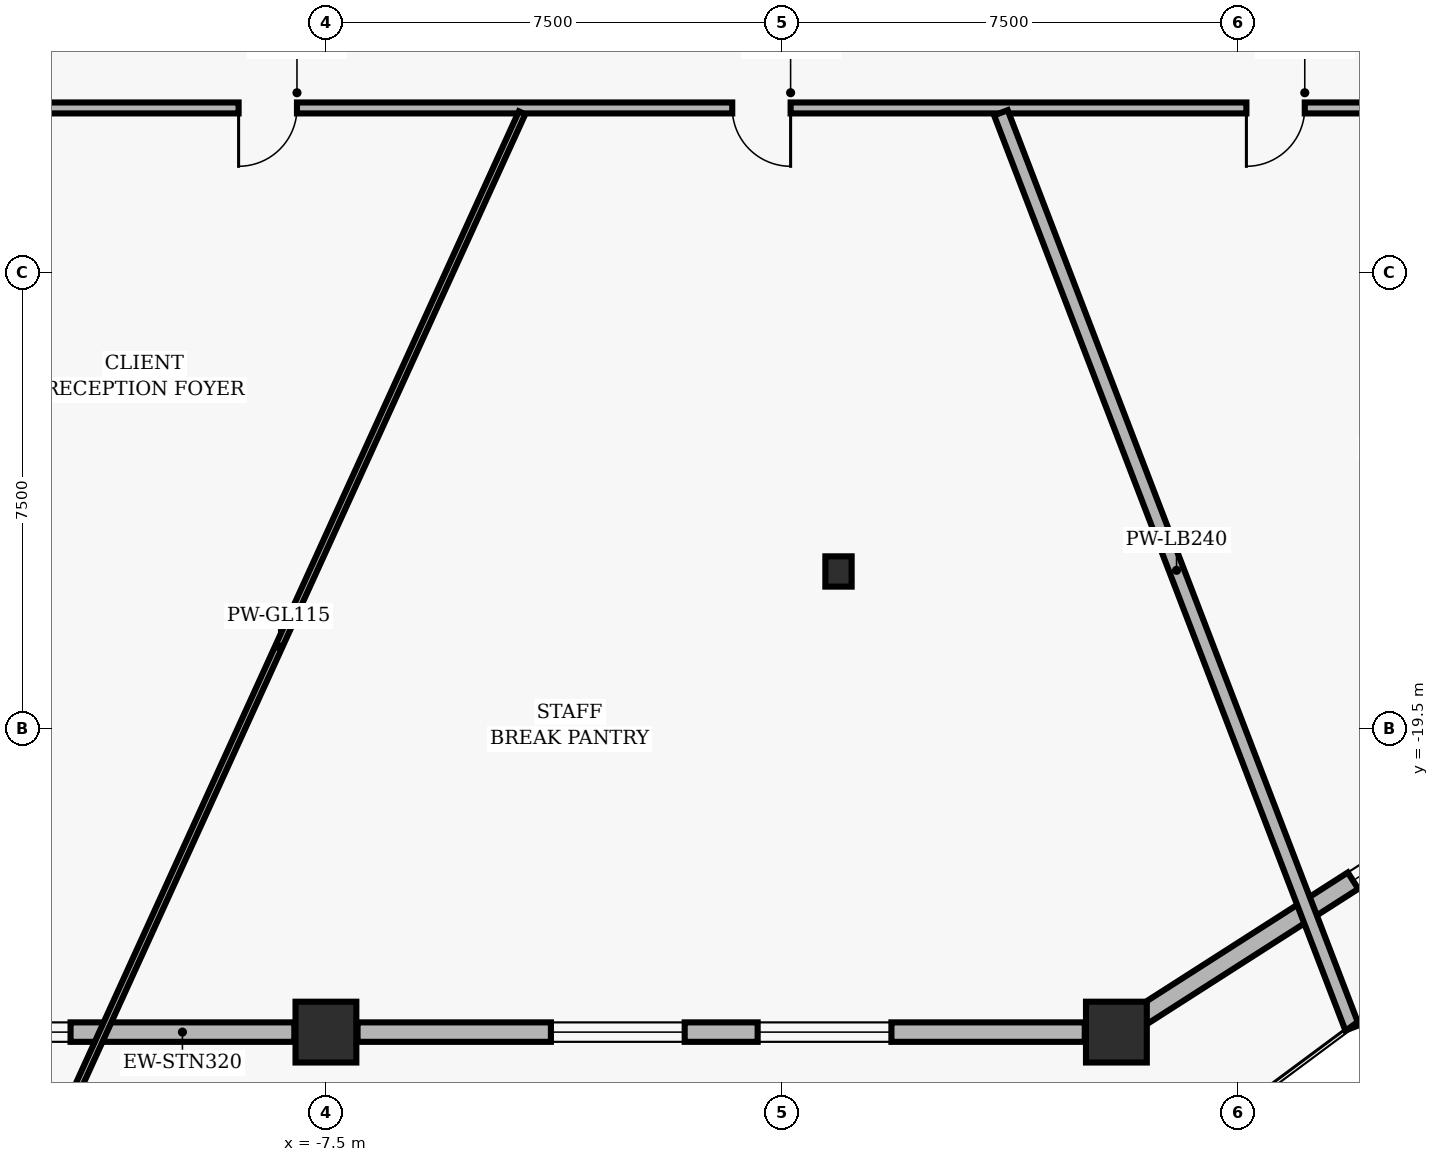
"""IFC4 building model, lengths in metres.
Left out: names, types, materials, properties, quantities, classifications, styles, units other than length and angle.
Written with IfcOpenShell. Run it as: python <this file> out.ifc"""

import sys

from ifc_helpers import new_model, si_unit, direction, frame, frame_2d, origin, origin_2d, place, context, subcontext, project, spatial, rectangle, i_section, extrude, element, fill, save


model = new_model("IFC4")
c1 = context("Model", 3, precision=1e-05, world=origin(), true_north=direction((0.0, 1.0)))
c2 = subcontext(c1, "Body", "Model", "MODEL_VIEW")
j1 = project(units=[si_unit("LENGTHUNIT", "METRE"), si_unit("PLANEANGLEUNIT", "RADIAN")], contexts=[c1])
p1 = place(None, origin())
s1 = spatial("IfcSite", under=j1, at=p1, CompositionType="ELEMENT")
p2 = place(p1, origin())
s2 = spatial("IfcBuilding", under=s1, at=p2, CompositionType="ELEMENT")
p3 = place(p2, frame((0.0, 0.0, 15.36)))
s3 = spatial("IfcBuildingStorey", under=s2, at=p3, CompositionType="ELEMENT", Elevation=15.36)
for number, where, z_axis, x_axis in (
    (1, (-7.5, -24.5, 0.0), (0.0, 0.0, 1.0), (1.0, 0.0, 0.0)),
    (2, (5.5, -24.5, 0.0), (0.0, 0.0, 1.0), (1.0, 0.0, 0.0)),
):
    element("IfcColumn", number, at=place(p3, frame(where, z_axis=z_axis, x_axis=x_axis)), inside=s3, PredefinedType="COLUMN", context=c2, shape_type="SweptSolid", body=[
        extrude(rectangle(XDim=1.0, YDim=1.0, at=origin_2d()), origin(), (0.0, 0.0, 1.0), 3.52),
    ])
p4 = place(p3, frame((0.93, -16.924, 0.0), z_axis=(0.0, 0.0, 1.0), x_axis=(1.0, 0.0, 0.0)))
e3 = element("IfcColumn", 3, at=p4, inside=s3, PredefinedType="COLUMN", context=c2, shape_type="SweptSolid", body=[
    extrude(i_section(OverallWidth=0.432, OverallDepth=0.498, WebThickness=0.056, FlangeThickness=0.089, FilletRadius=0.025, at=origin_2d()), origin(), (0.0, 0.0, 1.0), 3.52),
])
p5 = place(p3, frame((-8.02, -24.5, 0.0), z_axis=(0.0, 0.0, 1.0), x_axis=(-1.0, 0.0, 0.0)))
e4 = element("IfcWall", 4, at=p5, inside=s3, PredefinedType="SOLIDWALL", context=c2, shape_type="SweptSolid", body=[
    extrude(rectangle(XDim=12.96, YDim=0.32, at=frame_2d((6.48, 0.0))), origin(), (0.0, 0.0, 1.0), 1.65),
])
p6 = place(p5, frame((3.68, 0.0, 0.4)))
e5 = element("IfcOpeningElement", 5, at=p6, cuts=e4, PredefinedType="OPENING", context=c2, shape_type="SweptSolid", body=[
    extrude(rectangle(XDim=2.2, YDim=1.1, at=frame_2d((1.1, 0.55))), frame((0.0, 0.17, 0.0), z_axis=(0.0, -1.0, 0.0), x_axis=(1.0, 0.0, 0.0)), (0.0, 0.0, 1.0), 0.34),
])
p7 = place(p5, frame((7.08, 0.0, 0.4)))
e6 = element("IfcOpeningElement", 6, at=p7, cuts=e4, PredefinedType="OPENING", context=c2, shape_type="SweptSolid", body=[
    extrude(rectangle(XDim=2.2, YDim=1.1, at=frame_2d((1.1, 0.55))), frame((0.0, 0.17, 0.0), z_axis=(0.0, -1.0, 0.0), x_axis=(1.0, 0.0, 0.0)), (0.0, 0.0, 1.0), 0.34),
])
p8 = place(p3, frame((4.98, -24.5, 0.0), z_axis=(0.0, 0.0, 1.0), x_axis=(-1.0, 0.0, 0.0)))
e7 = element("IfcWall", 7, at=p8, inside=s3, PredefinedType="SOLIDWALL", context=c2, shape_type="SweptSolid", body=[
    extrude(rectangle(XDim=11.96, YDim=0.32, at=frame_2d((5.98, 0.0))), origin(), (0.0, 0.0, 1.0), 1.65),
])
p9 = place(p8, frame((3.18, 0.0, 0.4)))
e8 = element("IfcOpeningElement", 8, at=p9, cuts=e7, PredefinedType="OPENING", context=c2, shape_type="SweptSolid", body=[
    extrude(rectangle(XDim=2.2, YDim=1.1, at=frame_2d((1.1, 0.55))), frame((0.0, 0.17, 0.0), z_axis=(0.0, -1.0, 0.0), x_axis=(1.0, 0.0, 0.0)), (0.0, 0.0, 1.0), 0.34),
])
p10 = place(p8, frame((6.58, 0.0, 0.4)))
e9 = element("IfcOpeningElement", 9, at=p10, cuts=e7, PredefinedType="OPENING", context=c2, shape_type="SweptSolid", body=[
    extrude(rectangle(XDim=2.2, YDim=1.1, at=frame_2d((1.1, 0.55))), frame((0.0, 0.17, 0.0), z_axis=(0.0, -1.0, 0.0), x_axis=(1.0, 0.0, 0.0)), (0.0, 0.0, 1.0), 0.34),
])
p11 = place(p3, frame((17.562, -16.78, 0.0), z_axis=(0.0, 0.0, 1.0), x_axis=(-0.842268830443, -0.539057712368, 0.0)))
e10 = element("IfcWall", 10, at=p11, inside=s3, PredefinedType="SOLIDWALL", context=c2, shape_type="SweptSolid", body=[
    extrude(rectangle(XDim=13.801, YDim=0.32, at=frame_2d((6.9, 0.0))), origin(), (0.0, 0.0, 1.0), 1.65),
])
p12 = place(p11, frame((4.1, 0.0, 0.4)))
e11 = element("IfcOpeningElement", 11, at=p12, cuts=e10, PredefinedType="OPENING", context=c2, shape_type="SweptSolid", body=[
    extrude(rectangle(XDim=2.2, YDim=1.1, at=frame_2d((1.1, 0.55))), frame((0.0, 0.17, 0.0), z_axis=(0.0, -1.0, 0.0), x_axis=(1.0, 0.0, 0.0)), (0.0, 0.0, 1.0), 0.34),
])
p13 = place(p11, frame((7.5, 0.0, 0.4)))
e12 = element("IfcOpeningElement", 12, at=p13, cuts=e10, PredefinedType="OPENING", context=c2, shape_type="SweptSolid", body=[
    extrude(rectangle(XDim=2.2, YDim=1.1, at=frame_2d((1.1, 0.55))), frame((0.0, 0.17, 0.0), z_axis=(0.0, -1.0, 0.0), x_axis=(1.0, 0.0, 0.0)), (0.0, 0.0, 1.0), 0.34),
])
p14 = place(p3, frame((12.89, -9.3, 0.0), z_axis=(0.0, 0.0, 1.0), x_axis=(-1.0, 0.0, 0.0)))
e13 = element("IfcWall", 13, at=p14, inside=s3, PredefinedType="PARTITIONING", context=c2, shape_type="SweptSolid", body=[
    extrude(rectangle(XDim=25.78, YDim=0.18, at=frame_2d((12.89, 0.0))), origin(), (0.0, 0.0, 1.0), 2.587),
])
p15 = place(p14, frame((20.866, 0.0, 0.0)))
e14 = element("IfcOpeningElement", 14, at=p15, cuts=e13, PredefinedType="OPENING", context=c2, shape_type="SweptSolid", body=[
    extrude(rectangle(XDim=0.96, YDim=2.02, at=frame_2d((0.48, 1.01))), frame((0.0, 0.1, 0.0), z_axis=(0.0, -1.0, 0.0), x_axis=(1.0, 0.0, 0.0)), (0.0, 0.0, 1.0), 0.2),
])
p16 = place(p14, frame((12.748, 0.0, 0.0)))
e15 = element("IfcOpeningElement", 15, at=p16, cuts=e13, PredefinedType="OPENING", context=c2, shape_type="SweptSolid", body=[
    extrude(rectangle(XDim=0.96, YDim=2.02, at=frame_2d((0.48, 1.01))), frame((0.0, 0.1, 0.0), z_axis=(0.0, -1.0, 0.0), x_axis=(1.0, 0.0, 0.0)), (0.0, 0.0, 1.0), 0.2),
])
p17 = place(p14, frame((4.292, 0.0, 0.0)))
e16 = element("IfcOpeningElement", 16, at=p17, cuts=e13, PredefinedType="OPENING", context=c2, shape_type="SweptSolid", body=[
    extrude(rectangle(XDim=0.96, YDim=2.02, at=frame_2d((0.48, 1.01))), frame((0.0, 0.1, 0.0), z_axis=(0.0, -1.0, 0.0), x_axis=(1.0, 0.0, 0.0)), (0.0, 0.0, 1.0), 0.2),
])
p18 = place(p3, frame((-4.275, -9.38, 0.0), z_axis=(0.0, 0.0, 1.0), x_axis=(-0.414697782226, -0.909959202062, 0.0)))
e17 = element("IfcWall", 17, at=p18, inside=s3, PredefinedType="MOVABLE", context=c2, shape_type="SweptSolid", body=[
    extrude(rectangle(XDim=19.298, YDim=0.115, at=frame_2d((9.649, 0.0))), origin(), (0.0, 0.0, 1.0), 3.073),
])
p19 = place(p3, frame((3.601, -9.38, 0.0), z_axis=(0.0, 0.0, 1.0), x_axis=(0.358364010281, -0.933581938629, 0.0)))
e18 = element("IfcWall", 18, at=p19, inside=s3, PredefinedType="PARTITIONING", context=c2, shape_type="SweptSolid", body=[
    extrude(rectangle(XDim=16.121, YDim=0.24, at=frame_2d((8.061, 0.0))), origin(), (0.0, 0.0, 1.0), 3.073),
])
p20 = place(p6, origin())
e19 = element("IfcWindow", 19, at=p20, inside=s3, PartitioningType="SINGLE_PANEL", PredefinedType="WINDOW", context=c2, shape_type="SweptSolid", body=[
    extrude(rectangle(XDim=2.2, YDim=1.1, at=frame_2d((1.1, 0.55))), frame((0.0, 0.03, 0.0), z_axis=(0.0, -1.0, 0.0), x_axis=(1.0, 0.0, 0.0)), (0.0, 0.0, 1.0), 0.06),
])
fill(e5, e19)
p21 = place(p9, origin())
e20 = element("IfcWindow", 20, at=p21, inside=s3, PartitioningType="SINGLE_PANEL", PredefinedType="WINDOW", context=c2, shape_type="SweptSolid", body=[
    extrude(rectangle(XDim=2.2, YDim=1.1, at=frame_2d((1.1, 0.55))), frame((0.0, 0.03, 0.0), z_axis=(0.0, -1.0, 0.0), x_axis=(1.0, 0.0, 0.0)), (0.0, 0.0, 1.0), 0.06),
])
fill(e8, e20)
p22 = place(p10, origin())
e21 = element("IfcWindow", 21, at=p22, inside=s3, PartitioningType="SINGLE_PANEL", PredefinedType="WINDOW", context=c2, shape_type="SweptSolid", body=[
    extrude(rectangle(XDim=2.2, YDim=1.1, at=frame_2d((1.1, 0.55))), frame((0.0, 0.03, 0.0), z_axis=(0.0, -1.0, 0.0), x_axis=(1.0, 0.0, 0.0)), (0.0, 0.0, 1.0), 0.06),
])
fill(e9, e21)
p23 = place(p13, origin())
e22 = element("IfcWindow", 22, at=p23, inside=s3, PartitioningType="SINGLE_PANEL", PredefinedType="WINDOW", context=c2, shape_type="SweptSolid", body=[
    extrude(rectangle(XDim=2.2, YDim=1.1, at=frame_2d((1.1, 0.55))), frame((0.0, 0.03, 0.0), z_axis=(0.0, -1.0, 0.0), x_axis=(1.0, 0.0, 0.0)), (0.0, 0.0, 1.0), 0.06),
])
fill(e12, e22)
p24 = place(p15, origin())
e23 = element("IfcDoor", 23, at=p24, inside=s3, OperationType="SINGLE_SWING_RIGHT", PredefinedType="DOOR", context=c2, shape_type="SweptSolid", body=[
    extrude(rectangle(XDim=0.96, YDim=2.02, at=frame_2d((0.48, 1.01))), frame((0.0, 0.025, 0.0), z_axis=(0.0, -1.0, 0.0), x_axis=(1.0, 0.0, 0.0)), (0.0, 0.0, 1.0), 0.05),
])
fill(e14, e23)
p25 = place(p16, origin())
e24 = element("IfcDoor", 24, at=p25, inside=s3, OperationType="SINGLE_SWING_LEFT", PredefinedType="DOOR", context=c2, shape_type="SweptSolid", body=[
    extrude(rectangle(XDim=0.96, YDim=2.02, at=frame_2d((0.48, 1.01))), frame((0.0, 0.025, 0.0), z_axis=(0.0, -1.0, 0.0), x_axis=(1.0, 0.0, 0.0)), (0.0, 0.0, 1.0), 0.05),
])
fill(e15, e24)
p26 = place(p17, origin())
e25 = element("IfcDoor", 25, at=p26, inside=s3, OperationType="SINGLE_SWING_RIGHT", PredefinedType="DOOR", context=c2, shape_type="SweptSolid", body=[
    extrude(rectangle(XDim=0.96, YDim=2.02, at=frame_2d((0.48, 1.01))), frame((0.0, 0.025, 0.0), z_axis=(0.0, -1.0, 0.0), x_axis=(1.0, 0.0, 0.0)), (0.0, 0.0, 1.0), 0.05),
])
fill(e16, e25)
save(model, sys.argv[1])
